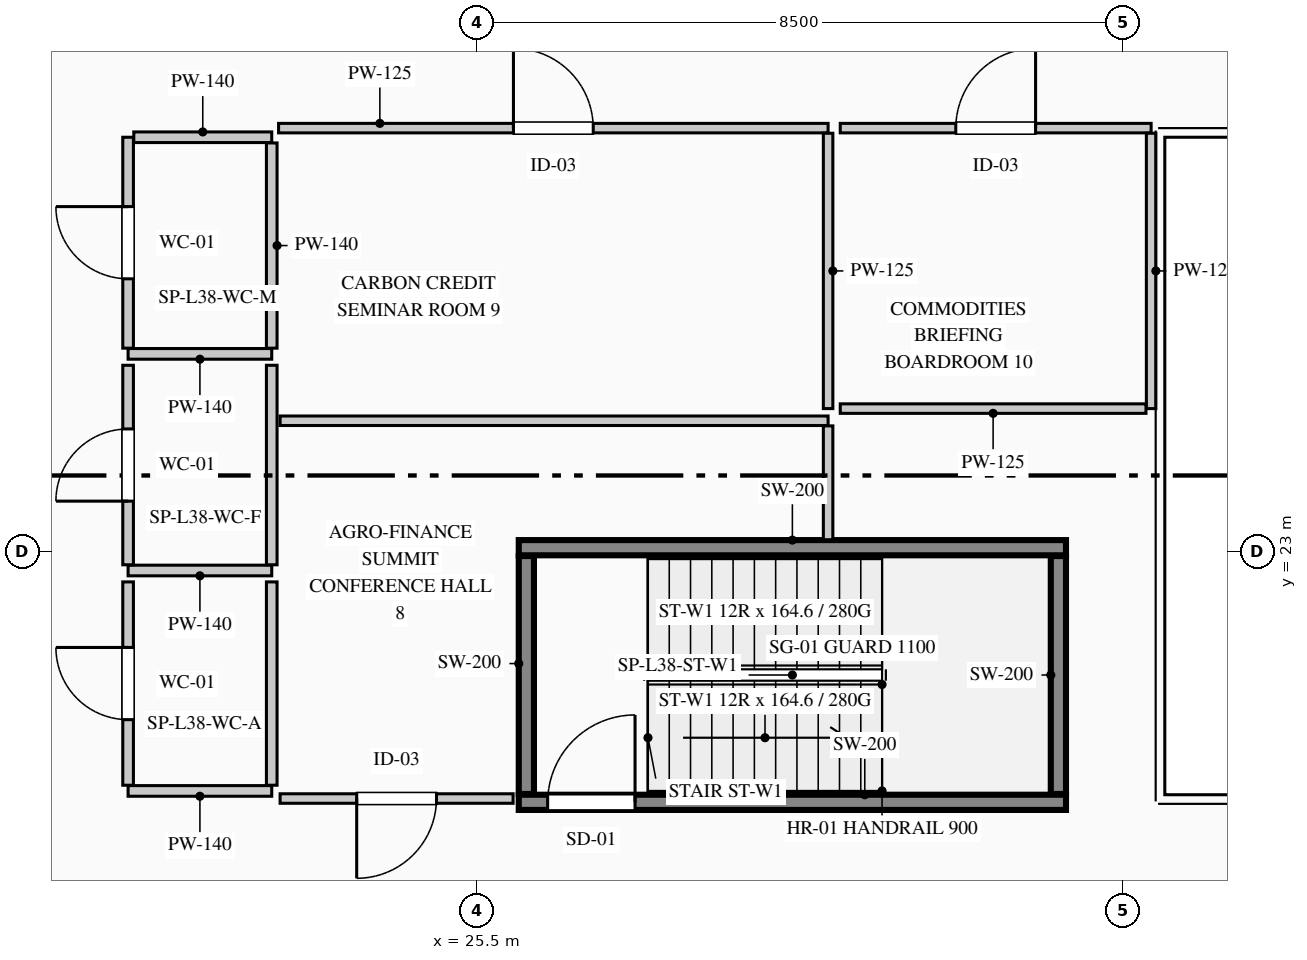
"""IFC4 building model, lengths in metres.
Left out: names, types, materials, properties, quantities, classifications, styles, units other than length and angle.
Written with IfcOpenShell. Run it as: python <this file> out.ifc"""

import sys

from ifc_helpers import new_model, si_unit, direction, frame, frame_2d, origin, place, context, subcontext, project, spatial, rectangle, extrude, element, fill, save


model = new_model("IFC4")
c1 = context("Model", 3, precision=1e-05, world=origin(), true_north=direction((0.0, 1.0)))
c2 = subcontext(c1, "Body", "Model", "MODEL_VIEW")
j1 = project(units=[si_unit("LENGTHUNIT", "METRE"), si_unit("PLANEANGLEUNIT", "RADIAN")], contexts=[c1])
p1 = place(None, origin())
s1 = spatial("IfcSite", under=j1, at=p1, CompositionType="ELEMENT")
p2 = place(p1, origin())
s2 = spatial("IfcBuilding", under=s1, at=p2, CompositionType="ELEMENT")
p3 = place(p2, frame((0.0, 0.0, 162.75)))
s3 = spatial("IfcBuildingStorey", under=s2, at=p3, CompositionType="ELEMENT", Elevation=162.75)
p4 = place(p3, frame((26.05, 19.7, 0.0), z_axis=(0.0, 0.0, 1.0), x_axis=(1.0, 0.0, 0.0)))
e1 = element("IfcWall", 1, at=p4, inside=s3, PredefinedType="SHEAR", context=c2, shape_type="SweptSolid", body=[
    extrude(rectangle(XDim=7.2, YDim=0.2, at=frame_2d((3.6, 0.0))), origin(), (0.0, 0.0, 1.0), 3.95),
])
p5 = place(p4, frame((0.38, 0.0, 0.0)))
e2 = element("IfcOpeningElement", 2, at=p5, cuts=e1, PredefinedType="OPENING", context=c2, shape_type="SweptSolid", body=[
    extrude(rectangle(XDim=1.15, YDim=2.2, at=frame_2d((0.575, 1.1))), frame((0.0, 0.11, 0.0), z_axis=(0.0, -1.0, 0.0), x_axis=(1.0, 0.0, 0.0)), (0.0, 0.0, 1.0), 0.22),
])
p6 = place(p3, frame((26.05, 23.05, 0.0), z_axis=(0.0, 0.0, 1.0), x_axis=(1.0, 0.0, 0.0)))
e3 = element("IfcWall", 3, at=p6, inside=s3, PredefinedType="SHEAR", context=c2, shape_type="SweptSolid", body=[
    extrude(rectangle(XDim=7.2, YDim=0.2, at=frame_2d((3.6, 0.0))), origin(), (0.0, 0.0, 1.0), 3.95),
])
for number, where, z_axis, x_axis in (
    (4, (26.15, 19.81, 0.0), (0.0, 0.0, 1.0), (0.0, 1.0, 0.0)),
    (5, (33.15, 19.81, 0.0), (0.0, 0.0, 1.0), (0.0, 1.0, 0.0)),
):
    element("IfcWall", number, at=place(p3, frame(where, z_axis=z_axis, x_axis=x_axis)), inside=s3, PredefinedType="SHEAR", context=c2, shape_type="SweptSolid", body=[
        extrude(rectangle(XDim=3.13, YDim=0.2, at=frame_2d((1.565, 0.0))), origin(), (0.0, 0.0, 1.0), 3.95),
    ])
p7 = place(p3, frame((22.8, 25.6, 0.0), z_axis=(0.0, 0.0, 1.0), x_axis=(-1.0, 0.0, 0.0)))
e6 = element("IfcWall", 6, at=p7, inside=s3, PredefinedType="PARTITIONING", context=c2, shape_type="SweptSolid", body=[
    extrude(rectangle(XDim=1.89, YDim=0.14, at=frame_2d((0.945, 0.0))), origin(), (0.0, 0.0, 1.0), 3.69),
])
p8 = place(p3, frame((20.91, 25.675, 0.0), z_axis=(0.0, 0.0, 1.0), x_axis=(0.0, 1.0, 0.0)))
e7 = element("IfcWall", 7, at=p8, inside=s3, PredefinedType="PARTITIONING", context=c2, shape_type="SweptSolid", body=[
    extrude(rectangle(XDim=2.775, YDim=0.14, at=frame_2d((1.387, 0.0))), origin(), (0.0, 0.0, 1.0), 3.69),
])
p9 = place(p8, frame((0.913, 0.0, 0.0)))
e8 = element("IfcOpeningElement", 8, at=p9, cuts=e7, PredefinedType="OPENING", context=c2, shape_type="SweptSolid", body=[
    extrude(rectangle(XDim=0.95, YDim=2.15, at=frame_2d((0.475, 1.075))), frame((0.0, 0.08, 0.0), z_axis=(0.0, -1.0, 0.0), x_axis=(1.0, 0.0, 0.0)), (0.0, 0.0, 1.0), 0.16),
])
p10 = place(p3, frame((20.985, 28.45, 0.0), z_axis=(0.0, 0.0, 1.0), x_axis=(1.0, 0.0, 0.0)))
e9 = element("IfcWall", 9, at=p10, inside=s3, PredefinedType="PARTITIONING", context=c2, shape_type="SweptSolid", body=[
    extrude(rectangle(XDim=1.815, YDim=0.14, at=frame_2d((0.907, 0.0))), origin(), (0.0, 0.0, 1.0), 3.69),
])
p11 = place(p3, frame((22.8, 28.375, 0.0), z_axis=(0.0, 0.0, 1.0), x_axis=(0.0, -1.0, 0.0)))
e10 = element("IfcWall", 10, at=p11, inside=s3, PredefinedType="PARTITIONING", context=c2, shape_type="SweptSolid", body=[
    extrude(rectangle(XDim=2.7, YDim=0.14, at=frame_2d((1.35, 0.0))), origin(), (0.0, 0.0, 1.0), 3.375),
])
p12 = place(p3, frame((22.8, 22.75, 0.0), z_axis=(0.0, 0.0, 1.0), x_axis=(-1.0, 0.0, 0.0)))
e11 = element("IfcWall", 11, at=p12, inside=s3, PredefinedType="PARTITIONING", context=c2, shape_type="SweptSolid", body=[
    extrude(rectangle(XDim=1.89, YDim=0.14, at=frame_2d((0.945, 0.0))), origin(), (0.0, 0.0, 1.0), 3.69),
])
p13 = place(p3, frame((20.91, 22.825, 0.0), z_axis=(0.0, 0.0, 1.0), x_axis=(0.0, 1.0, 0.0)))
e12 = element("IfcWall", 12, at=p13, inside=s3, PredefinedType="PARTITIONING", context=c2, shape_type="SweptSolid", body=[
    extrude(rectangle(XDim=2.625, YDim=0.14, at=frame_2d((1.312, 0.0))), origin(), (0.0, 0.0, 1.0), 3.69),
])
p14 = place(p13, frame((0.837, 0.0, 0.0)))
e13 = element("IfcOpeningElement", 13, at=p14, cuts=e12, PredefinedType="OPENING", context=c2, shape_type="SweptSolid", body=[
    extrude(rectangle(XDim=0.95, YDim=2.15, at=frame_2d((0.475, 1.075))), frame((0.0, 0.08, 0.0), z_axis=(0.0, -1.0, 0.0), x_axis=(1.0, 0.0, 0.0)), (0.0, 0.0, 1.0), 0.16),
])
p15 = place(p3, frame((22.8, 25.45, 0.0), z_axis=(0.0, 0.0, 1.0), x_axis=(0.0, -1.0, 0.0)))
e14 = element("IfcWall", 14, at=p15, inside=s3, PredefinedType="PARTITIONING", context=c2, shape_type="SweptSolid", body=[
    extrude(rectangle(XDim=2.625, YDim=0.14, at=frame_2d((1.312, 0.0))), origin(), (0.0, 0.0, 1.0), 3.375),
])
p16 = place(p3, frame((22.8, 19.85, 0.0), z_axis=(0.0, 0.0, 1.0), x_axis=(-1.0, 0.0, 0.0)))
e15 = element("IfcWall", 15, at=p16, inside=s3, PredefinedType="PARTITIONING", context=c2, shape_type="SweptSolid", body=[
    extrude(rectangle(XDim=1.89, YDim=0.14, at=frame_2d((0.945, 0.0))), origin(), (0.0, 0.0, 1.0), 3.69),
])
p17 = place(p3, frame((20.91, 19.925, 0.0), z_axis=(0.0, 0.0, 1.0), x_axis=(0.0, 1.0, 0.0)))
e16 = element("IfcWall", 16, at=p17, inside=s3, PredefinedType="PARTITIONING", context=c2, shape_type="SweptSolid", body=[
    extrude(rectangle(XDim=2.675, YDim=0.14, at=frame_2d((1.337, 0.0))), origin(), (0.0, 0.0, 1.0), 3.69),
])
p18 = place(p17, frame((0.863, 0.0, 0.0)))
e17 = element("IfcOpeningElement", 17, at=p18, cuts=e16, PredefinedType="OPENING", context=c2, shape_type="SweptSolid", body=[
    extrude(rectangle(XDim=0.95, YDim=2.15, at=frame_2d((0.475, 1.075))), frame((0.0, 0.08, 0.0), z_axis=(0.0, -1.0, 0.0), x_axis=(1.0, 0.0, 0.0)), (0.0, 0.0, 1.0), 0.16),
])
p19 = place(p3, frame((22.8, 22.6, 0.0), z_axis=(0.0, 0.0, 1.0), x_axis=(0.0, -1.0, 0.0)))
e18 = element("IfcWall", 18, at=p19, inside=s3, PredefinedType="PARTITIONING", context=c2, shape_type="SweptSolid", body=[
    extrude(rectangle(XDim=2.675, YDim=0.14, at=frame_2d((1.337, 0.0))), origin(), (0.0, 0.0, 1.0), 3.375),
])
p20 = place(p3, frame((25.976, 19.75, 0.0), z_axis=(0.0, 0.0, 1.0), x_axis=(-1.0, 0.0, 0.0)))
e19 = element("IfcWall", 19, at=p20, inside=s3, PredefinedType="PARTITIONING", context=c2, shape_type="SweptSolid", body=[
    extrude(rectangle(XDim=3.066, YDim=0.125, at=frame_2d((1.533, 0.0))), origin(), (0.0, 0.0, 1.0), 3.69),
])
p21 = place(p20, frame((1.008, 0.0, 0.0)))
e20 = element("IfcOpeningElement", 20, at=p21, cuts=e19, PredefinedType="OPENING", context=c2, shape_type="SweptSolid", body=[
    extrude(rectangle(XDim=1.05, YDim=2.15, at=frame_2d((0.525, 1.075))), frame((0.0, 0.073, 0.0), z_axis=(0.0, -1.0, 0.0), x_axis=(1.0, 0.0, 0.0)), (0.0, 0.0, 1.0), 0.145),
])
p22 = place(p3, frame((22.91, 24.72, 0.0), z_axis=(0.0, 0.0, 1.0), x_axis=(1.0, 0.0, 0.0)))
e21 = element("IfcWall", 21, at=p22, inside=s3, PredefinedType="PARTITIONING", context=c2, shape_type="SweptSolid", body=[
    extrude(rectangle(XDim=7.21, YDim=0.125, at=frame_2d((3.605, 0.0))), origin(), (0.0, 0.0, 1.0), 3.375),
])
p23 = place(p3, frame((30.12, 24.653, 0.0), z_axis=(0.0, 0.0, 1.0), x_axis=(0.0, -1.0, 0.0)))
e22 = element("IfcWall", 22, at=p23, inside=s3, PredefinedType="PARTITIONING", context=c2, shape_type="SweptSolid", body=[
    extrude(rectangle(XDim=1.498, YDim=0.125, at=frame_2d((0.749, 0.0))), origin(), (0.0, 0.0, 1.0), 3.69),
])
p24 = place(p3, frame((22.89, 28.57, 0.0), z_axis=(0.0, 0.0, 1.0), x_axis=(1.0, 0.0, 0.0)))
e23 = element("IfcWall", 23, at=p24, inside=s3, PredefinedType="PARTITIONING", context=c2, shape_type="SweptSolid", body=[
    extrude(rectangle(XDim=7.23, YDim=0.125, at=frame_2d((3.615, 0.0))), origin(), (0.0, 0.0, 1.0), 3.375),
])
p25 = place(p24, frame((3.09, 0.0, 0.0)))
e24 = element("IfcOpeningElement", 24, at=p25, cuts=e23, PredefinedType="OPENING", context=c2, shape_type="SweptSolid", body=[
    extrude(rectangle(XDim=1.05, YDim=2.15, at=frame_2d((0.525, 1.075))), frame((0.0, 0.073, 0.0), z_axis=(0.0, -1.0, 0.0), x_axis=(1.0, 0.0, 0.0)), (0.0, 0.0, 1.0), 0.145),
])
p26 = place(p3, frame((30.12, 28.502, 0.0), z_axis=(0.0, 0.0, 1.0), x_axis=(0.0, -1.0, 0.0)))
e25 = element("IfcWall", 25, at=p26, inside=s3, PredefinedType="PARTITIONING", context=c2, shape_type="SweptSolid", body=[
    extrude(rectangle(XDim=3.623, YDim=0.125, at=frame_2d((1.811, 0.0))), origin(), (0.0, 0.0, 1.0), 3.69),
])
p27 = place(p3, frame((30.28, 28.57, 0.0), z_axis=(0.0, 0.0, 1.0), x_axis=(1.0, 0.0, 0.0)))
e26 = element("IfcWall", 26, at=p27, inside=s3, PredefinedType="PARTITIONING", context=c2, shape_type="SweptSolid", body=[
    extrude(rectangle(XDim=4.09, YDim=0.125, at=frame_2d((2.045, 0.0))), origin(), (0.0, 0.0, 1.0), 3.375),
])
p28 = place(p27, frame((1.52, 0.0, 0.0)))
e27 = element("IfcOpeningElement", 27, at=p28, cuts=e26, PredefinedType="OPENING", context=c2, shape_type="SweptSolid", body=[
    extrude(rectangle(XDim=1.05, YDim=2.15, at=frame_2d((0.525, 1.075))), frame((0.0, 0.073, 0.0), z_axis=(0.0, -1.0, 0.0), x_axis=(1.0, 0.0, 0.0)), (0.0, 0.0, 1.0), 0.145),
])
p29 = place(p3, frame((34.37, 28.502, 0.0), z_axis=(0.0, 0.0, 1.0), x_axis=(0.0, -1.0, 0.0)))
e28 = element("IfcWall", 28, at=p29, inside=s3, PredefinedType="PARTITIONING", context=c2, shape_type="SweptSolid", body=[
    extrude(rectangle(XDim=3.623, YDim=0.125, at=frame_2d((1.811, 0.0))), origin(), (0.0, 0.0, 1.0), 3.69),
])
p30 = place(p3, frame((34.302, 24.88, 0.0), z_axis=(0.0, 0.0, 1.0), x_axis=(-1.0, 0.0, 0.0)))
e29 = element("IfcWall", 29, at=p30, inside=s3, PredefinedType="PARTITIONING", context=c2, shape_type="SweptSolid", body=[
    extrude(rectangle(XDim=4.022, YDim=0.125, at=frame_2d((2.011, 0.0))), origin(), (0.0, 0.0, 1.0), 3.375),
])
p31 = place(p5, origin())
e30 = element("IfcDoor", 30, at=p31, inside=s3, OperationType="SINGLE_SWING_RIGHT", PredefinedType="DOOR", context=c2, shape_type="SweptSolid", body=[
    extrude(rectangle(XDim=1.15, YDim=2.2, at=frame_2d((0.575, 1.1))), frame((0.0, 0.025, 0.0), z_axis=(0.0, -1.0, 0.0), x_axis=(1.0, 0.0, 0.0)), (0.0, 0.0, 1.0), 0.05),
])
fill(e2, e30)
p32 = place(p9, origin())
e31 = element("IfcDoor", 31, at=p32, inside=s3, OperationType="SINGLE_SWING_RIGHT", PredefinedType="DOOR", context=c2, shape_type="SweptSolid", body=[
    extrude(rectangle(XDim=0.95, YDim=2.15, at=frame_2d((0.475, 1.075))), frame((0.0, 0.025, 0.0), z_axis=(0.0, -1.0, 0.0), x_axis=(1.0, 0.0, 0.0)), (0.0, 0.0, 1.0), 0.05),
])
fill(e8, e31)
p33 = place(p14, origin())
e32 = element("IfcDoor", 32, at=p33, inside=s3, OperationType="SINGLE_SWING_LEFT", PredefinedType="DOOR", context=c2, shape_type="SweptSolid", body=[
    extrude(rectangle(XDim=0.95, YDim=2.15, at=frame_2d((0.475, 1.075))), frame((0.0, 0.025, 0.0), z_axis=(0.0, -1.0, 0.0), x_axis=(1.0, 0.0, 0.0)), (0.0, 0.0, 1.0), 0.05),
])
fill(e13, e32)
p34 = place(p18, origin())
e33 = element("IfcDoor", 33, at=p34, inside=s3, OperationType="SINGLE_SWING_RIGHT", PredefinedType="DOOR", context=c2, shape_type="SweptSolid", body=[
    extrude(rectangle(XDim=0.95, YDim=2.15, at=frame_2d((0.475, 1.075))), frame((0.0, 0.025, 0.0), z_axis=(0.0, -1.0, 0.0), x_axis=(1.0, 0.0, 0.0)), (0.0, 0.0, 1.0), 0.05),
])
fill(e17, e33)
p35 = place(p21, origin())
e34 = element("IfcDoor", 34, at=p35, inside=s3, OperationType="SINGLE_SWING_RIGHT", PredefinedType="DOOR", context=c2, shape_type="SweptSolid", body=[
    extrude(rectangle(XDim=1.05, YDim=2.15, at=frame_2d((0.525, 1.075))), frame((0.0, 0.025, 0.0), z_axis=(0.0, -1.0, 0.0), x_axis=(1.0, 0.0, 0.0)), (0.0, 0.0, 1.0), 0.05),
])
fill(e20, e34)
p36 = place(p25, origin())
e35 = element("IfcDoor", 35, at=p36, inside=s3, OperationType="SINGLE_SWING_LEFT", PredefinedType="DOOR", context=c2, shape_type="SweptSolid", body=[
    extrude(rectangle(XDim=1.05, YDim=2.15, at=frame_2d((0.525, 1.075))), frame((0.0, 0.025, 0.0), z_axis=(0.0, -1.0, 0.0), x_axis=(1.0, 0.0, 0.0)), (0.0, 0.0, 1.0), 0.05),
])
fill(e24, e35)
p37 = place(p28, origin())
e36 = element("IfcDoor", 36, at=p37, inside=s3, OperationType="SINGLE_SWING_RIGHT", PredefinedType="DOOR", context=c2, shape_type="SweptSolid", body=[
    extrude(rectangle(XDim=1.05, YDim=2.15, at=frame_2d((0.525, 1.075))), frame((0.0, 0.025, 0.0), z_axis=(0.0, -1.0, 0.0), x_axis=(1.0, 0.0, 0.0)), (0.0, 0.0, 1.0), 0.05),
])
fill(e27, e36)
save(model, sys.argv[1])
